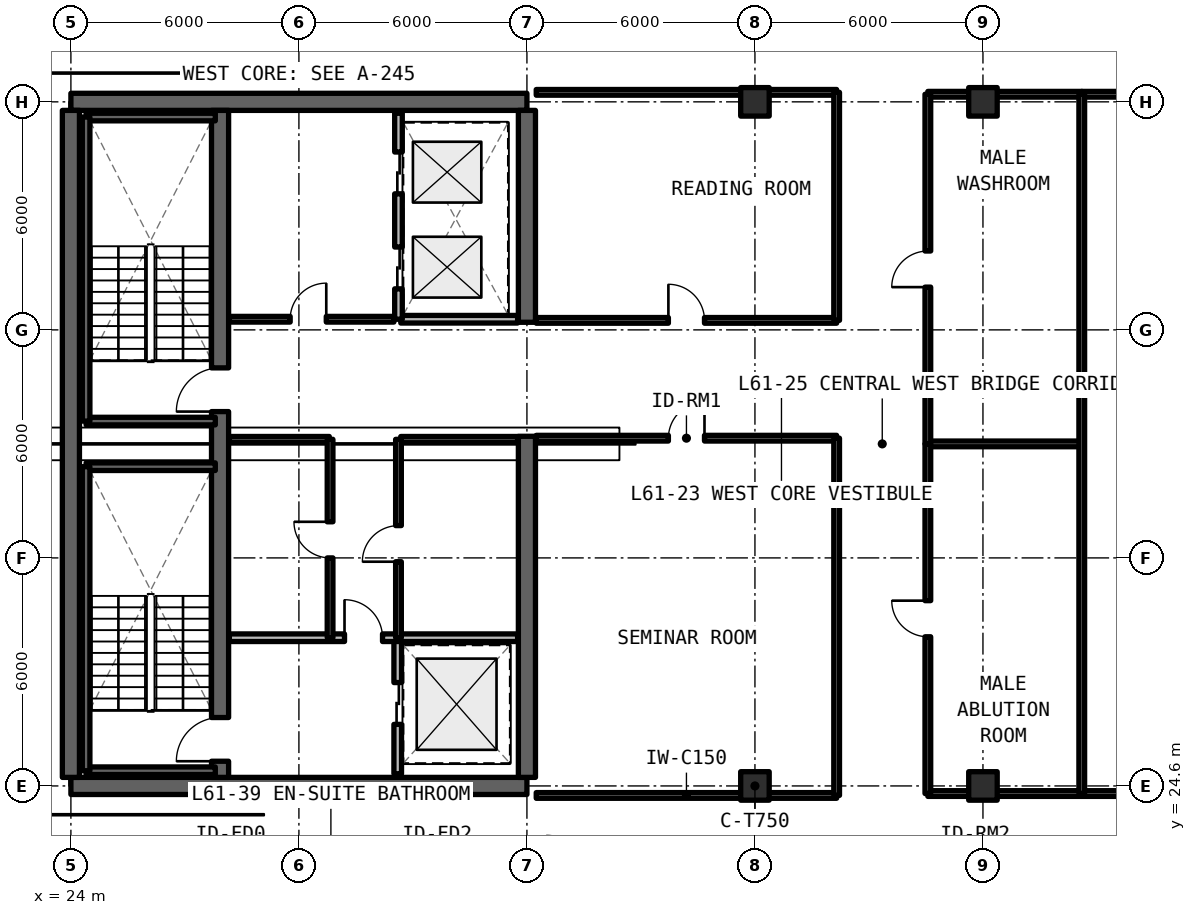
"""IFC4 building model, lengths in metres.
Left out: names, types, materials, properties, quantities, classifications, styles, units other than length and angle.
Written with IfcOpenShell. Run it as: python <this file> out.ifc"""

import sys

from ifc_helpers import new_model, si_unit, direction, frame, frame_2d, origin, origin_2d, place, context, subcontext, project, spatial, rectangle, extrude, element, fill, save


model = new_model("IFC4")
c1 = context("Model", 3, precision=1e-05, world=origin(), true_north=direction((0.0, 1.0)))
c2 = subcontext(c1, "Body", "Model", "MODEL_VIEW")
j1 = project(units=[si_unit("LENGTHUNIT", "METRE"), si_unit("PLANEANGLEUNIT", "RADIAN")], contexts=[c1])
p1 = place(None, origin())
s1 = spatial("IfcSite", under=j1, at=p1, CompositionType="ELEMENT")
p2 = place(p1, origin())
s2 = spatial("IfcBuilding", under=s1, at=p2, CompositionType="ELEMENT")
p3 = place(p2, frame((0.0, 0.0, 219.12)))
s3 = spatial("IfcBuildingStorey", under=s2, at=p3, CompositionType="ELEMENT", Elevation=219.12)
for number, where, z_axis, x_axis in (
    (1, (24.0, 24.6, 0.0), (0.0, 0.0, 1.0), (1.0, 0.0, 0.0)),
    (2, (36.0, 42.6, 0.0), (0.0, 0.0, 1.0), (-1.0, 0.0, 0.0)),
):
    element("IfcWall", number, at=place(p3, frame(where, z_axis=z_axis, x_axis=x_axis)), inside=s3, PredefinedType="SHEAR", context=c2, shape_type="SweptSolid", body=[
        extrude(rectangle(XDim=12.0, YDim=0.45, at=frame_2d((6.0, 0.0))), origin(), (0.0, 0.0, 1.0), 3.63),
    ])
p4 = place(p3, frame((24.0, 24.825, 0.0), z_axis=(0.0, 0.0, 1.0), x_axis=(0.0, 1.0, 0.0)))
e3 = element("IfcWall", 3, at=p4, inside=s3, PredefinedType="SHEAR", context=c2, shape_type="SweptSolid", body=[
    extrude(rectangle(XDim=17.55, YDim=0.45, at=frame_2d((8.775, 0.0))), origin(), (0.0, 0.0, 1.0), 3.63),
])
p5 = place(p3, frame((36.0, 24.825, 0.0), z_axis=(0.0, 0.0, 1.0), x_axis=(0.0, 1.0, 0.0)))
e4 = element("IfcWall", 4, at=p5, inside=s3, PredefinedType="SHEAR", context=c2, shape_type="SweptSolid", body=[
    extrude(rectangle(XDim=8.975, YDim=0.45, at=frame_2d((4.488, 0.0))), origin(), (0.0, 0.0, 1.0), 3.63),
])
p6 = place(p3, frame((36.0, 36.8, 0.0), z_axis=(0.0, 0.0, 1.0), x_axis=(0.0, 1.0, 0.0)))
e5 = element("IfcWall", 5, at=p6, inside=s3, PredefinedType="SHEAR", context=c2, shape_type="SweptSolid", body=[
    extrude(rectangle(XDim=5.575, YDim=0.45, at=frame_2d((2.788, 0.0))), origin(), (0.0, 0.0, 1.0), 3.63),
])
p7 = place(p3, frame((27.925, 24.825, 0.0), z_axis=(0.0, 0.0, 1.0), x_axis=(0.0, 1.0, 0.0)))
e6 = element("IfcWall", 6, at=p7, inside=s3, PredefinedType="SHEAR", context=c2, shape_type="SweptSolid", body=[
    extrude(rectangle(XDim=17.55, YDim=0.45, at=frame_2d((8.775, 0.0))), origin(), (0.0, 0.0, 1.0), 3.63),
])
p8 = place(p7, frame((0.425, 0.0, 0.0)))
e7 = element("IfcOpeningElement", 7, at=p8, cuts=e6, PredefinedType="OPENING", context=c2, shape_type="SweptSolid", body=[
    extrude(rectangle(XDim=1.15, YDim=2.15, at=frame_2d((0.575, 1.075))), frame((0.0, 0.235, 0.0), z_axis=(0.0, -1.0, 0.0), x_axis=(1.0, 0.0, 0.0)), (0.0, 0.0, 1.0), 0.47),
])
p9 = place(p7, frame((9.625, 0.0, 0.0)))
e8 = element("IfcOpeningElement", 8, at=p9, cuts=e6, PredefinedType="OPENING", context=c2, shape_type="SweptSolid", body=[
    extrude(rectangle(XDim=1.15, YDim=2.15, at=frame_2d((0.575, 1.075))), frame((0.0, 0.235, 0.0), z_axis=(0.0, -1.0, 0.0), x_axis=(1.0, 0.0, 0.0)), (0.0, 0.0, 1.0), 0.47),
])
for number, where, z_axis, x_axis in (
    (9, (42.0, 24.6, 0.0), (0.0, 0.0, 1.0), (1.0, 0.0, 0.0)),
    (10, (42.0, 42.6, 0.0), (0.0, 0.0, 1.0), (1.0, 0.0, 0.0)),
    (11, (48.0, 24.6, 0.0), (0.0, 0.0, 1.0), (1.0, 0.0, 0.0)),
    (12, (48.0, 42.6, 0.0), (0.0, 0.0, 1.0), (1.0, 0.0, 0.0)),
):
    element("IfcColumn", number, at=place(p3, frame(where, z_axis=z_axis, x_axis=x_axis)), inside=s3, PredefinedType="COLUMN", context=c2, shape_type="SweptSolid", body=[
        extrude(rectangle(XDim=0.75, YDim=0.75, at=origin_2d()), origin(), (0.0, 0.0, 1.0), 3.63),
    ])
p10 = place(p3, frame((32.6, 24.92, 0.0), z_axis=(0.0, 0.0, 1.0), x_axis=(0.0, 1.0, 0.0)))
e13 = element("IfcWall", 13, at=p10, inside=s3, PredefinedType="SOLIDWALL", context=c2, shape_type="SweptSolid", body=[
    extrude(rectangle(XDim=3.58, YDim=0.2, at=frame_2d((1.79, 0.0))), origin(), (0.0, 0.0, 1.0), 2.63),
])
p11 = place(p10, frame((1.3, 0.0, 0.0)))
e14 = element("IfcOpeningElement", 14, at=p11, cuts=e13, PredefinedType="OPENING", context=c2, shape_type="SweptSolid", body=[
    extrude(rectangle(XDim=1.1, YDim=2.2, at=frame_2d((0.55, 1.1))), frame((0.0, 0.11, 0.0), z_axis=(0.0, -1.0, 0.0), x_axis=(1.0, 0.0, 0.0)), (0.0, 0.0, 1.0), 0.22),
])
p12 = place(p3, frame((28.17, 28.5, 0.0), z_axis=(0.0, 0.0, 1.0), x_axis=(1.0, 0.0, 0.0)))
e15 = element("IfcWall", 15, at=p12, inside=s3, PredefinedType="SOLIDWALL", context=c2, shape_type="SweptSolid", body=[
    extrude(rectangle(XDim=7.585, YDim=0.2, at=frame_2d((3.792, 0.0))), origin(), (0.0, 0.0, 1.0), 2.63),
])
p13 = place(p12, frame((3.03, 0.0, 0.0)))
e16 = element("IfcOpeningElement", 16, at=p13, cuts=e15, PredefinedType="OPENING", context=c2, shape_type="SweptSolid", body=[
    extrude(rectangle(XDim=1.0, YDim=2.15, at=frame_2d((0.5, 1.075))), frame((0.0, 0.11, 0.0), z_axis=(0.0, -1.0, 0.0), x_axis=(1.0, 0.0, 0.0)), (0.0, 0.0, 1.0), 0.22),
])
p14 = place(p3, frame((28.17, 33.72, 0.0), z_axis=(0.0, 0.0, 1.0), x_axis=(1.0, 0.0, 0.0)))
e17 = element("IfcWall", 17, at=p14, inside=s3, PredefinedType="SOLIDWALL", context=c2, shape_type="SweptSolid", body=[
    extrude(rectangle(XDim=2.63, YDim=0.15, at=frame_2d((1.315, 0.0))), origin(), (0.0, 0.0, 1.0), 2.63),
])
p15 = place(p3, frame((30.82, 28.5, 0.0), z_axis=(0.0, 0.0, 1.0), x_axis=(0.0, 1.0, 0.0)))
e18 = element("IfcWall", 18, at=p15, inside=s3, PredefinedType="SOLIDWALL", context=c2, shape_type="SweptSolid", body=[
    extrude(rectangle(XDim=5.22, YDim=0.15, at=frame_2d((2.61, 0.0))), origin(), (0.0, 0.0, 1.0), 2.63),
])
p16 = place(p15, frame((2.1, 0.0, 0.0)))
e19 = element("IfcOpeningElement", 19, at=p16, cuts=e18, PredefinedType="OPENING", context=c2, shape_type="SweptSolid", body=[
    extrude(rectangle(XDim=0.95, YDim=2.15, at=frame_2d((0.475, 1.075))), frame((0.0, 0.085, 0.0), z_axis=(0.0, -1.0, 0.0), x_axis=(1.0, 0.0, 0.0)), (0.0, 0.0, 1.0), 0.17),
])
p17 = place(p3, frame((32.68, 33.72, 0.0), z_axis=(0.0, 0.0, 1.0), x_axis=(1.0, 0.0, 0.0)))
e20 = element("IfcWall", 20, at=p17, inside=s3, PredefinedType="SOLIDWALL", context=c2, shape_type="SweptSolid", body=[
    extrude(rectangle(XDim=3.075, YDim=0.15, at=frame_2d((1.538, 0.0))), origin(), (0.0, 0.0, 1.0), 2.63),
])
p18 = place(p3, frame((32.62, 28.5, 0.0), z_axis=(0.0, 0.0, 1.0), x_axis=(0.0, 1.0, 0.0)))
e21 = element("IfcWall", 21, at=p18, inside=s3, PredefinedType="SOLIDWALL", context=c2, shape_type="SweptSolid", body=[
    extrude(rectangle(XDim=5.22, YDim=0.15, at=frame_2d((2.61, 0.0))), origin(), (0.0, 0.0, 1.0), 2.63),
])
p19 = place(p18, frame((2.0, 0.0, 0.0)))
e22 = element("IfcOpeningElement", 22, at=p19, cuts=e21, PredefinedType="OPENING", context=c2, shape_type="SweptSolid", body=[
    extrude(rectangle(XDim=0.95, YDim=2.15, at=frame_2d((0.475, 1.075))), frame((0.0, 0.085, 0.0), z_axis=(0.0, -1.0, 0.0), x_axis=(1.0, 0.0, 0.0)), (0.0, 0.0, 1.0), 0.17),
])
p20 = place(p3, frame((28.17, 36.88, 0.0), z_axis=(0.0, 0.0, 1.0), x_axis=(1.0, 0.0, 0.0)))
e23 = element("IfcWall", 23, at=p20, inside=s3, PredefinedType="SOLIDWALL", context=c2, shape_type="SweptSolid", body=[
    extrude(rectangle(XDim=4.33, YDim=0.15, at=frame_2d((2.165, 0.0))), origin(), (0.0, 0.0, 1.0), 2.63),
])
p21 = place(p20, frame((1.6, 0.0, 0.0)))
e24 = element("IfcOpeningElement", 24, at=p21, cuts=e23, PredefinedType="OPENING", context=c2, shape_type="SweptSolid", body=[
    extrude(rectangle(XDim=0.95, YDim=2.15, at=frame_2d((0.475, 1.075))), frame((0.0, 0.085, 0.0), z_axis=(0.0, -1.0, 0.0), x_axis=(1.0, 0.0, 0.0)), (0.0, 0.0, 1.0), 0.17),
])
p22 = place(p3, frame((32.68, 36.88, 0.0), z_axis=(0.0, 0.0, 1.0), x_axis=(1.0, 0.0, 0.0)))
e25 = element("IfcWall", 25, at=p22, inside=s3, PredefinedType="SOLIDWALL", context=c2, shape_type="SweptSolid", body=[
    extrude(rectangle(XDim=3.075, YDim=0.2, at=frame_2d((1.538, 0.0))), origin(), (0.0, 0.0, 1.0), 2.63),
])
p23 = place(p3, frame((32.62, 36.88, 0.0), z_axis=(0.0, 0.0, 1.0), x_axis=(0.0, 1.0, 0.0)))
e26 = element("IfcWall", 26, at=p23, inside=s3, PredefinedType="SOLIDWALL", context=c2, shape_type="SweptSolid", body=[
    extrude(rectangle(XDim=5.42, YDim=0.2, at=frame_2d((2.71, 0.0))), origin(), (0.0, 0.0, 1.0), 2.63),
])
p24 = place(p23, frame((0.8, 0.0, 0.0)))
e27 = element("IfcOpeningElement", 27, at=p24, cuts=e26, PredefinedType="OPENING", context=c2, shape_type="SweptSolid", body=[
    extrude(rectangle(XDim=1.1, YDim=2.2, at=frame_2d((0.55, 1.1))), frame((0.0, 0.11, 0.0), z_axis=(0.0, -1.0, 0.0), x_axis=(1.0, 0.0, 0.0)), (0.0, 0.0, 1.0), 0.22),
])
p25 = place(p23, frame((3.3, 0.0, 0.0)))
e28 = element("IfcOpeningElement", 28, at=p25, cuts=e26, PredefinedType="OPENING", context=c2, shape_type="SweptSolid", body=[
    extrude(rectangle(XDim=1.1, YDim=2.2, at=frame_2d((0.55, 1.1))), frame((0.0, 0.11, 0.0), z_axis=(0.0, -1.0, 0.0), x_axis=(1.0, 0.0, 0.0)), (0.0, 0.0, 1.0), 0.22),
])
p26 = place(p3, frame((36.245, 24.35, 0.0), z_axis=(0.0, 0.0, 1.0), x_axis=(1.0, 0.0, 0.0)))
e29 = element("IfcWall", 29, at=p26, inside=s3, PredefinedType="SOLIDWALL", context=c2, shape_type="SweptSolid", body=[
    extrude(rectangle(XDim=7.905, YDim=0.15, at=frame_2d((3.952, 0.0))), origin(), (0.0, 0.0, 1.0), 2.63),
])
p27 = place(p3, frame((36.245, 33.75, 0.0), z_axis=(0.0, 0.0, 1.0), x_axis=(1.0, 0.0, 0.0)))
e30 = element("IfcWall", 30, at=p27, inside=s3, PredefinedType="SOLIDWALL", context=c2, shape_type="SweptSolid", body=[
    extrude(rectangle(XDim=7.905, YDim=0.15, at=frame_2d((3.952, 0.0))), origin(), (0.0, 0.0, 1.0), 2.63),
])
p28 = place(p27, frame((3.478, 0.0, 0.0)))
e31 = element("IfcOpeningElement", 31, at=p28, cuts=e30, PredefinedType="OPENING", context=c2, shape_type="SweptSolid", body=[
    extrude(rectangle(XDim=0.95, YDim=2.15, at=frame_2d((0.475, 1.075))), frame((0.0, 0.085, 0.0), z_axis=(0.0, -1.0, 0.0), x_axis=(1.0, 0.0, 0.0)), (0.0, 0.0, 1.0), 0.17),
])
p29 = place(p3, frame((44.15, 24.35, 0.0), z_axis=(0.0, 0.0, 1.0), x_axis=(0.0, 1.0, 0.0)))
e32 = element("IfcWall", 32, at=p29, inside=s3, PredefinedType="SOLIDWALL", context=c2, shape_type="SweptSolid", body=[
    extrude(rectangle(XDim=9.4, YDim=0.15, at=frame_2d((4.7, 0.0))), origin(), (0.0, 0.0, 1.0), 2.63),
])
p30 = place(p3, frame((36.245, 36.85, 0.0), z_axis=(0.0, 0.0, 1.0), x_axis=(1.0, 0.0, 0.0)))
e33 = element("IfcWall", 33, at=p30, inside=s3, PredefinedType="SOLIDWALL", context=c2, shape_type="SweptSolid", body=[
    extrude(rectangle(XDim=7.905, YDim=0.15, at=frame_2d((3.952, 0.0))), origin(), (0.0, 0.0, 1.0), 2.63),
])
p31 = place(p30, frame((3.478, 0.0, 0.0)))
e34 = element("IfcOpeningElement", 34, at=p31, cuts=e33, PredefinedType="OPENING", context=c2, shape_type="SweptSolid", body=[
    extrude(rectangle(XDim=0.95, YDim=2.15, at=frame_2d((0.475, 1.075))), frame((0.0, 0.085, 0.0), z_axis=(0.0, -1.0, 0.0), x_axis=(1.0, 0.0, 0.0)), (0.0, 0.0, 1.0), 0.17),
])
p32 = place(p3, frame((36.245, 42.85, 0.0), z_axis=(0.0, 0.0, 1.0), x_axis=(1.0, 0.0, 0.0)))
e35 = element("IfcWall", 35, at=p32, inside=s3, PredefinedType="SOLIDWALL", context=c2, shape_type="SweptSolid", body=[
    extrude(rectangle(XDim=7.905, YDim=0.15, at=frame_2d((3.952, 0.0))), origin(), (0.0, 0.0, 1.0), 2.63),
])
p33 = place(p3, frame((44.15, 36.85, 0.0), z_axis=(0.0, 0.0, 1.0), x_axis=(0.0, 1.0, 0.0)))
e36 = element("IfcWall", 36, at=p33, inside=s3, PredefinedType="SOLIDWALL", context=c2, shape_type="SweptSolid", body=[
    extrude(rectangle(XDim=6.0, YDim=0.15, at=frame_2d((3.0, 0.0))), origin(), (0.0, 0.0, 1.0), 2.63),
])
for number, where, z_axis, x_axis in (
    (37, (46.55, 24.4, 0.0), (0.0, 0.0, 1.0), (1.0, 0.0, 0.0)),
    (38, (46.55, 33.6, 0.0), (0.0, 0.0, 1.0), (1.0, 0.0, 0.0)),
):
    element("IfcWall", number, at=place(p3, frame(where, z_axis=z_axis, x_axis=x_axis)), inside=s3, PredefinedType="SOLIDWALL", context=c2, shape_type="SweptSolid", body=[
        extrude(rectangle(XDim=4.05, YDim=0.15, at=frame_2d((2.025, 0.0))), origin(), (0.0, 0.0, 1.0), 2.63),
    ])
p34 = place(p3, frame((46.55, 24.4, 0.0), z_axis=(0.0, 0.0, 1.0), x_axis=(0.0, 1.0, 0.0)))
e39 = element("IfcWall", 39, at=p34, inside=s3, PredefinedType="SOLIDWALL", context=c2, shape_type="SweptSolid", body=[
    extrude(rectangle(XDim=9.2, YDim=0.15, at=frame_2d((4.6, 0.0))), origin(), (0.0, 0.0, 1.0), 2.63),
])
p35 = place(p34, frame((4.125, 0.0, 0.0)))
e40 = element("IfcOpeningElement", 40, at=p35, cuts=e39, PredefinedType="OPENING", context=c2, shape_type="SweptSolid", body=[
    extrude(rectangle(XDim=0.95, YDim=2.15, at=frame_2d((0.475, 1.075))), frame((0.0, 0.085, 0.0), z_axis=(0.0, -1.0, 0.0), x_axis=(1.0, 0.0, 0.0)), (0.0, 0.0, 1.0), 0.17),
])
p36 = place(p3, frame((46.55, 42.8, 0.0), z_axis=(0.0, 0.0, 1.0), x_axis=(1.0, 0.0, 0.0)))
e41 = element("IfcWall", 41, at=p36, inside=s3, PredefinedType="SOLIDWALL", context=c2, shape_type="SweptSolid", body=[
    extrude(rectangle(XDim=4.05, YDim=0.15, at=frame_2d((2.025, 0.0))), origin(), (0.0, 0.0, 1.0), 2.63),
])
p37 = place(p3, frame((46.55, 33.6, 0.0), z_axis=(0.0, 0.0, 1.0), x_axis=(0.0, 1.0, 0.0)))
e42 = element("IfcWall", 42, at=p37, inside=s3, PredefinedType="SOLIDWALL", context=c2, shape_type="SweptSolid", body=[
    extrude(rectangle(XDim=9.2, YDim=0.15, at=frame_2d((4.6, 0.0))), origin(), (0.0, 0.0, 1.0), 2.63),
])
p38 = place(p37, frame((4.125, 0.0, 0.0)))
e43 = element("IfcOpeningElement", 43, at=p38, cuts=e42, PredefinedType="OPENING", context=c2, shape_type="SweptSolid", body=[
    extrude(rectangle(XDim=0.95, YDim=2.15, at=frame_2d((0.475, 1.075))), frame((0.0, 0.085, 0.0), z_axis=(0.0, -1.0, 0.0), x_axis=(1.0, 0.0, 0.0)), (0.0, 0.0, 1.0), 0.17),
])
p39 = place(p3, frame((50.6, 24.4, 0.0), z_axis=(0.0, 0.0, 1.0), x_axis=(1.0, 0.0, 0.0)))
e44 = element("IfcWall", 44, at=p39, inside=s3, PredefinedType="SOLIDWALL", context=c2, shape_type="SweptSolid", body=[
    extrude(rectangle(XDim=12.8, YDim=0.15, at=frame_2d((6.4, 0.0))), origin(), (0.0, 0.0, 1.0), 2.63),
])
p40 = place(p39, frame((5.7, 0.0, 0.0)))
e45 = element("IfcOpeningElement", 45, at=p40, cuts=e44, PredefinedType="OPENING", context=c2, shape_type="SweptSolid", body=[
    extrude(rectangle(XDim=1.4, YDim=2.15, at=frame_2d((0.7, 1.075))), frame((0.0, 0.085, 0.0), z_axis=(0.0, -1.0, 0.0), x_axis=(1.0, 0.0, 0.0)), (0.0, 0.0, 1.0), 0.17),
])
p41 = place(p3, frame((50.6, 42.8, 0.0), z_axis=(0.0, 0.0, 1.0), x_axis=(1.0, 0.0, 0.0)))
e46 = element("IfcWall", 46, at=p41, inside=s3, PredefinedType="SOLIDWALL", context=c2, shape_type="SweptSolid", body=[
    extrude(rectangle(XDim=12.8, YDim=0.15, at=frame_2d((6.4, 0.0))), origin(), (0.0, 0.0, 1.0), 2.63),
])
p42 = place(p3, frame((50.6, 24.4, 0.0), z_axis=(0.0, 0.0, 1.0), x_axis=(0.0, 1.0, 0.0)))
e47 = element("IfcWall", 47, at=p42, inside=s3, PredefinedType="SOLIDWALL", context=c2, shape_type="SweptSolid", body=[
    extrude(rectangle(XDim=18.4, YDim=0.15, at=frame_2d((9.2, 0.0))), origin(), (0.0, 0.0, 1.0), 2.63),
])
for number, where, z_axis, x_axis in (
    (48, (24.4, 25.0, 0.0), (0.0, 0.0, 1.0), (1.0, 0.0, 0.0)),
    (49, (27.8, 33.0, 0.0), (0.0, 0.0, 1.0), (-1.0, 0.0, 0.0)),
):
    element("IfcWall", number, at=place(p3, frame(where, z_axis=z_axis, x_axis=x_axis)), inside=s3, PredefinedType="SOLIDWALL", context=c2, shape_type="SweptSolid", body=[
        extrude(rectangle(XDim=3.4, YDim=0.2, at=frame_2d((1.7, 0.0))), origin(), (0.0, 0.0, 1.0), 3.63),
    ])
p43 = place(p3, frame((24.4, 33.0, 0.0), z_axis=(0.0, 0.0, 1.0), x_axis=(0.0, -1.0, 0.0)))
e50 = element("IfcWall", 50, at=p43, inside=s3, PredefinedType="SOLIDWALL", context=c2, shape_type="SweptSolid", body=[
    extrude(rectangle(XDim=8.0, YDim=0.2, at=frame_2d((4.0, 0.0))), origin(), (0.0, 0.0, 1.0), 3.63),
])
for number, where, z_axis, x_axis in (
    (51, (24.4, 34.2, 0.0), (0.0, 0.0, 1.0), (1.0, 0.0, 0.0)),
    (52, (27.8, 42.2, 0.0), (0.0, 0.0, 1.0), (-1.0, 0.0, 0.0)),
):
    element("IfcWall", number, at=place(p3, frame(where, z_axis=z_axis, x_axis=x_axis)), inside=s3, PredefinedType="SOLIDWALL", context=c2, shape_type="SweptSolid", body=[
        extrude(rectangle(XDim=3.4, YDim=0.2, at=frame_2d((1.7, 0.0))), origin(), (0.0, 0.0, 1.0), 3.63),
    ])
p44 = place(p3, frame((24.4, 42.2, 0.0), z_axis=(0.0, 0.0, 1.0), x_axis=(0.0, -1.0, 0.0)))
e53 = element("IfcWall", 53, at=p44, inside=s3, PredefinedType="SOLIDWALL", context=c2, shape_type="SweptSolid", body=[
    extrude(rectangle(XDim=8.0, YDim=0.2, at=frame_2d((4.0, 0.0))), origin(), (0.0, 0.0, 1.0), 3.63),
])
p45 = place(p11, origin())
e54 = element("IfcDoor", 54, at=p45, inside=s3, OperationType="SLIDING_TO_LEFT", PredefinedType="DOOR", context=c2, shape_type="SweptSolid", body=[
    extrude(rectangle(XDim=1.1, YDim=2.2, at=frame_2d((0.55, 1.1))), frame((0.0, 0.025, 0.0), z_axis=(0.0, -1.0, 0.0), x_axis=(1.0, 0.0, 0.0)), (0.0, 0.0, 1.0), 0.05),
])
fill(e14, e54)
p46 = place(p13, origin())
e55 = element("IfcDoor", 55, at=p46, inside=s3, OperationType="SINGLE_SWING_LEFT", PredefinedType="DOOR", context=c2, shape_type="SweptSolid", body=[
    extrude(rectangle(XDim=1.0, YDim=2.15, at=frame_2d((0.5, 1.075))), frame((0.0, 0.025, 0.0), z_axis=(0.0, -1.0, 0.0), x_axis=(1.0, 0.0, 0.0)), (0.0, 0.0, 1.0), 0.05),
])
fill(e16, e55)
p47 = place(p16, origin())
e56 = element("IfcDoor", 56, at=p47, inside=s3, OperationType="SINGLE_SWING_RIGHT", PredefinedType="DOOR", context=c2, shape_type="SweptSolid", body=[
    extrude(rectangle(XDim=0.95, YDim=2.15, at=frame_2d((0.475, 1.075))), frame((0.0, 0.025, 0.0), z_axis=(0.0, -1.0, 0.0), x_axis=(1.0, 0.0, 0.0)), (0.0, 0.0, 1.0), 0.05),
])
fill(e19, e56)
p48 = place(p19, origin())
e57 = element("IfcDoor", 57, at=p48, inside=s3, OperationType="SINGLE_SWING_LEFT", PredefinedType="DOOR", context=c2, shape_type="SweptSolid", body=[
    extrude(rectangle(XDim=0.95, YDim=2.15, at=frame_2d((0.475, 1.075))), frame((0.0, 0.025, 0.0), z_axis=(0.0, -1.0, 0.0), x_axis=(1.0, 0.0, 0.0)), (0.0, 0.0, 1.0), 0.05),
])
fill(e22, e57)
p49 = place(p21, origin())
e58 = element("IfcDoor", 58, at=p49, inside=s3, OperationType="SINGLE_SWING_RIGHT", PredefinedType="DOOR", context=c2, shape_type="SweptSolid", body=[
    extrude(rectangle(XDim=0.95, YDim=2.15, at=frame_2d((0.475, 1.075))), frame((0.0, 0.025, 0.0), z_axis=(0.0, -1.0, 0.0), x_axis=(1.0, 0.0, 0.0)), (0.0, 0.0, 1.0), 0.05),
])
fill(e24, e58)
p50 = place(p24, origin())
e59 = element("IfcDoor", 59, at=p50, inside=s3, OperationType="SLIDING_TO_LEFT", PredefinedType="DOOR", context=c2, shape_type="SweptSolid", body=[
    extrude(rectangle(XDim=1.1, YDim=2.2, at=frame_2d((0.55, 1.1))), frame((0.0, 0.025, 0.0), z_axis=(0.0, -1.0, 0.0), x_axis=(1.0, 0.0, 0.0)), (0.0, 0.0, 1.0), 0.05),
])
fill(e27, e59)
p51 = place(p25, origin())
e60 = element("IfcDoor", 60, at=p51, inside=s3, OperationType="SLIDING_TO_RIGHT", PredefinedType="DOOR", context=c2, shape_type="SweptSolid", body=[
    extrude(rectangle(XDim=1.1, YDim=2.2, at=frame_2d((0.55, 1.1))), frame((0.0, 0.025, 0.0), z_axis=(0.0, -1.0, 0.0), x_axis=(1.0, 0.0, 0.0)), (0.0, 0.0, 1.0), 0.05),
])
fill(e28, e60)
p52 = place(p28, origin())
e61 = element("IfcDoor", 61, at=p52, inside=s3, OperationType="SINGLE_SWING_RIGHT", PredefinedType="DOOR", context=c2, shape_type="SweptSolid", body=[
    extrude(rectangle(XDim=0.95, YDim=2.15, at=frame_2d((0.475, 1.075))), frame((0.0, 0.025, 0.0), z_axis=(0.0, -1.0, 0.0), x_axis=(1.0, 0.0, 0.0)), (0.0, 0.0, 1.0), 0.05),
])
fill(e31, e61)
p53 = place(p31, origin())
e62 = element("IfcDoor", 62, at=p53, inside=s3, OperationType="SINGLE_SWING_LEFT", PredefinedType="DOOR", context=c2, shape_type="SweptSolid", body=[
    extrude(rectangle(XDim=0.95, YDim=2.15, at=frame_2d((0.475, 1.075))), frame((0.0, 0.025, 0.0), z_axis=(0.0, -1.0, 0.0), x_axis=(1.0, 0.0, 0.0)), (0.0, 0.0, 1.0), 0.05),
])
fill(e34, e62)
p54 = place(p35, origin())
e63 = element("IfcDoor", 63, at=p54, inside=s3, OperationType="SINGLE_SWING_RIGHT", PredefinedType="DOOR", context=c2, shape_type="SweptSolid", body=[
    extrude(rectangle(XDim=0.95, YDim=2.15, at=frame_2d((0.475, 1.075))), frame((0.0, 0.025, 0.0), z_axis=(0.0, -1.0, 0.0), x_axis=(1.0, 0.0, 0.0)), (0.0, 0.0, 1.0), 0.05),
])
fill(e40, e63)
p55 = place(p38, origin())
e64 = element("IfcDoor", 64, at=p55, inside=s3, OperationType="SINGLE_SWING_LEFT", PredefinedType="DOOR", context=c2, shape_type="SweptSolid", body=[
    extrude(rectangle(XDim=0.95, YDim=2.15, at=frame_2d((0.475, 1.075))), frame((0.0, 0.025, 0.0), z_axis=(0.0, -1.0, 0.0), x_axis=(1.0, 0.0, 0.0)), (0.0, 0.0, 1.0), 0.05),
])
fill(e43, e64)
p56 = place(p8, origin())
e65 = element("IfcDoor", 65, at=p56, inside=s3, OperationType="SINGLE_SWING_RIGHT", PredefinedType="DOOR", context=c2, shape_type="SweptSolid", body=[
    extrude(rectangle(XDim=1.15, YDim=2.15, at=frame_2d((0.575, 1.075))), frame((0.0, 0.025, 0.0), z_axis=(0.0, -1.0, 0.0), x_axis=(1.0, 0.0, 0.0)), (0.0, 0.0, 1.0), 0.05),
])
fill(e7, e65)
p57 = place(p9, origin())
e66 = element("IfcDoor", 66, at=p57, inside=s3, OperationType="SINGLE_SWING_LEFT", PredefinedType="DOOR", context=c2, shape_type="SweptSolid", body=[
    extrude(rectangle(XDim=1.15, YDim=2.15, at=frame_2d((0.575, 1.075))), frame((0.0, 0.025, 0.0), z_axis=(0.0, -1.0, 0.0), x_axis=(1.0, 0.0, 0.0)), (0.0, 0.0, 1.0), 0.05),
])
fill(e8, e66)
save(model, sys.argv[1])
